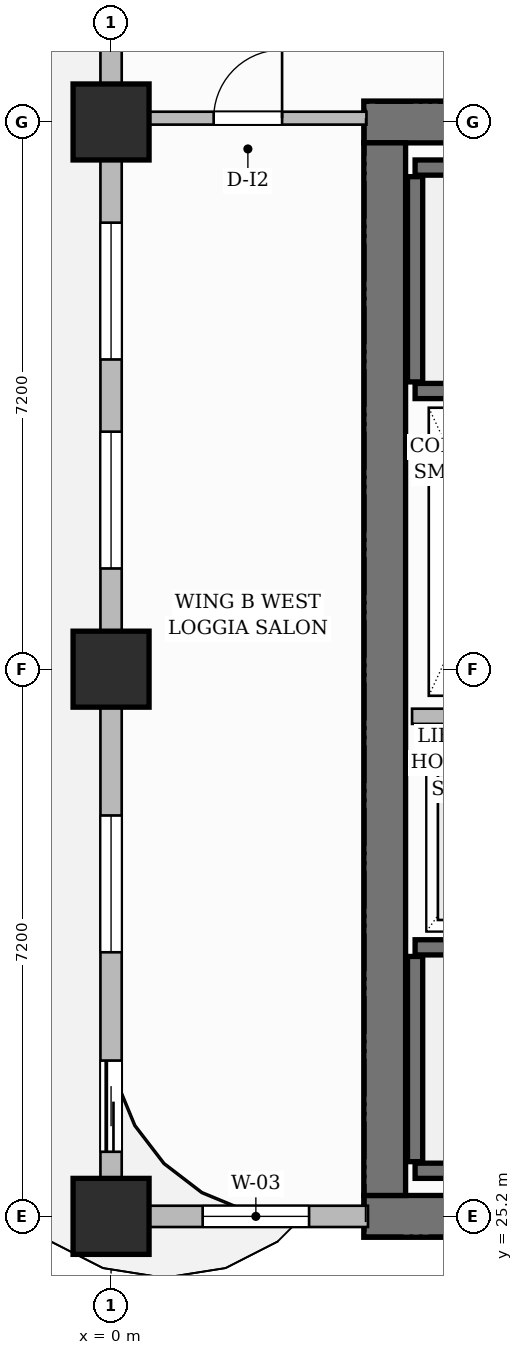
"""IFC4 building model, lengths in metres.
Left out: names, types, materials, properties, quantities, classifications, styles, units other than length and angle.
Written with IfcOpenShell. Run it as: python <this file> out.ifc"""

import sys

from ifc_helpers import new_model, si_unit, direction, frame, frame_2d, origin, origin_2d, place, context, subcontext, project, spatial, rectangle, extrude, source, transform, mapped, element, fill, save


model = new_model("IFC4")
c1 = context("Model", 3, precision=1e-05, world=origin(), true_north=direction((0.0, 1.0)))
c2 = subcontext(c1, "Body", "Model", "MODEL_VIEW")
j1 = project(units=[si_unit("LENGTHUNIT", "METRE"), si_unit("PLANEANGLEUNIT", "RADIAN")], contexts=[c1])
p1 = place(None, origin())
s1 = spatial("IfcSite", under=j1, at=p1, CompositionType="ELEMENT")
p2 = place(p1, origin())
s2 = spatial("IfcBuilding", under=s1, at=p2, CompositionType="ELEMENT")
p3 = place(p2, frame((0.0, 0.0, 134.0)))
s3 = spatial("IfcBuildingStorey", under=s2, at=p3, CompositionType="ELEMENT", Elevation=134.0)
for number, where, z_axis, x_axis in (
    (1, (3.325, 25.2, 0.0), (0.0, 0.0, 1.0), (1.0, 0.0, 0.0)),
    (2, (3.325, 39.6, 0.0), (0.0, 0.0, 1.0), (1.0, 0.0, 0.0)),
):
    element("IfcWall", number, at=place(p3, frame(where, z_axis=z_axis, x_axis=x_axis)), inside=s3, PredefinedType="SHEAR", context=c2, shape_type="SweptSolid", body=[
        extrude(rectangle(XDim=8.35, YDim=0.55, at=frame_2d((4.175, 0.0))), origin(), (0.0, 0.0, 1.0), 3.7),
    ])
p4 = place(p3, frame((3.6, 25.475, 0.0), z_axis=(0.0, 0.0, 1.0), x_axis=(0.0, 1.0, 0.0)))
e3 = element("IfcWall", 3, at=p4, inside=s3, PredefinedType="SHEAR", context=c2, shape_type="SweptSolid", body=[
    extrude(rectangle(XDim=13.85, YDim=0.55, at=frame_2d((6.925, 0.0))), origin(), (0.0, 0.0, 1.0), 3.7),
])
m1 = source(origin(), c2, "Body", "SweptSolid", [
    extrude(rectangle(XDim=1.0, YDim=1.0, at=origin_2d()), origin(), (0.0, 0.0, 1.0), 3.7),
])
for number, where, z_axis, x_axis in (
    (4, (0.0, 25.2, 0.0), (0.0, 0.0, 1.0), (1.0, 0.0, 0.0)),
    (5, (0.0, 32.4, 0.0), (0.0, 0.0, 1.0), (1.0, 0.0, 0.0)),
    (6, (0.0, 39.6, 0.0), (0.0, 0.0, 1.0), (1.0, 0.0, 0.0)),
):
    element("IfcColumn", number, at=place(p3, frame(where, z_axis=z_axis, x_axis=x_axis)), inside=s3, PredefinedType="COLUMN", context=c2, shape_type="MappedRepresentation", body=[
        mapped(m1, transform((0.0, 0.0, 0.0), scale=1.0)),
    ])
p5 = place(p3, frame((4.0, 25.8, 0.0), z_axis=(0.0, 0.0, 1.0), x_axis=(1.0, 0.0, 0.0)))
e7 = element("IfcWall", 7, at=p5, inside=s3, PredefinedType="SHEAR", context=c2, shape_type="SweptSolid", body=[
    extrude(rectangle(XDim=7.1, YDim=0.2, at=frame_2d((3.55, 0.0))), origin(), (0.0, 0.0, 1.0), 3.7),
])
p6 = place(p3, frame((4.0, 25.92, 0.0), z_axis=(0.0, 0.0, 1.0), x_axis=(0.0, 1.0, 0.0)))
e8 = element("IfcWall", 8, at=p6, inside=s3, PredefinedType="SHEAR", context=c2, shape_type="SweptSolid", body=[
    extrude(rectangle(XDim=2.7, YDim=0.2, at=frame_2d((1.35, 0.0))), origin(), (0.0, 0.0, 1.0), 3.7),
])
p7 = place(p3, frame((4.0, 28.74, 0.0), z_axis=(0.0, 0.0, 1.0), x_axis=(1.0, 0.0, 0.0)))
e9 = element("IfcWall", 9, at=p7, inside=s3, PredefinedType="SHEAR", context=c2, shape_type="SweptSolid", body=[
    extrude(rectangle(XDim=7.1, YDim=0.2, at=frame_2d((3.55, 0.0))), origin(), (0.0, 0.0, 1.0), 3.7),
])
p8 = place(p7, frame((5.815, 0.0, 0.0)))
e10 = element("IfcOpeningElement", 10, at=p8, cuts=e9, PredefinedType="OPENING", context=c2, shape_type="SweptSolid", body=[
    extrude(rectangle(XDim=1.05, YDim=2.2, at=frame_2d((0.525, 1.1))), frame((0.0, 0.11, 0.0), z_axis=(0.0, -1.0, 0.0), x_axis=(1.0, 0.0, 0.0)), (0.0, 0.0, 1.0), 0.22),
])
p9 = place(p3, frame((4.0, 39.0, 0.0), z_axis=(0.0, 0.0, 1.0), x_axis=(1.0, 0.0, 0.0)))
e11 = element("IfcWall", 11, at=p9, inside=s3, PredefinedType="SHEAR", context=c2, shape_type="SweptSolid", body=[
    extrude(rectangle(XDim=7.1, YDim=0.2, at=frame_2d((3.55, 0.0))), origin(), (0.0, 0.0, 1.0), 3.7),
])
p10 = place(p3, frame((4.0, 36.18, 0.0), z_axis=(0.0, 0.0, 1.0), x_axis=(0.0, 1.0, 0.0)))
e12 = element("IfcWall", 12, at=p10, inside=s3, PredefinedType="SHEAR", context=c2, shape_type="SweptSolid", body=[
    extrude(rectangle(XDim=2.7, YDim=0.2, at=frame_2d((1.35, 0.0))), origin(), (0.0, 0.0, 1.0), 3.7),
])
p11 = place(p3, frame((4.0, 36.06, 0.0), z_axis=(0.0, 0.0, 1.0), x_axis=(1.0, 0.0, 0.0)))
e13 = element("IfcWall", 13, at=p11, inside=s3, PredefinedType="SHEAR", context=c2, shape_type="SweptSolid", body=[
    extrude(rectangle(XDim=7.1, YDim=0.2, at=frame_2d((3.55, 0.0))), origin(), (0.0, 0.0, 1.0), 3.7),
])
p12 = place(p11, frame((5.815, 0.0, 0.0)))
e14 = element("IfcOpeningElement", 14, at=p12, cuts=e13, PredefinedType="OPENING", context=c2, shape_type="SweptSolid", body=[
    extrude(rectangle(XDim=1.05, YDim=2.2, at=frame_2d((0.525, 1.1))), frame((0.0, 0.11, 0.0), z_axis=(0.0, -1.0, 0.0), x_axis=(1.0, 0.0, 0.0)), (0.0, 0.0, 1.0), 0.22),
])
p13 = place(p3, frame((3.96, 31.78, 0.0), z_axis=(0.0, 0.0, 1.0), x_axis=(1.0, 0.0, 0.0)))
e15 = element("IfcWall", 15, at=p13, inside=s3, PredefinedType="PARTITIONING", context=c2, shape_type="SweptSolid", body=[
    extrude(rectangle(XDim=2.13, YDim=0.2, at=frame_2d((1.065, 0.0))), origin(), (0.0, 0.0, 1.0), 3.45),
])
p14 = place(p3, frame((0.24, 39.65, 0.0), z_axis=(0.0, 0.0, 1.0), x_axis=(1.0, 0.0, 0.0)))
e16 = element("IfcWall", 16, at=p14, inside=s3, PredefinedType="PARTITIONING", context=c2, shape_type="SweptSolid", body=[
    extrude(rectangle(XDim=3.12, YDim=0.17, at=frame_2d((1.56, 0.0))), origin(), (0.0, 0.0, 1.0), 3.45),
])
p15 = place(p14, frame((1.11, 0.0, 0.0)))
e17 = element("IfcOpeningElement", 17, at=p15, cuts=e16, PredefinedType="OPENING", context=c2, shape_type="SweptSolid", body=[
    extrude(rectangle(XDim=0.9, YDim=2.15, at=frame_2d((0.45, 1.075))), frame((0.0, 0.095, 0.0), z_axis=(0.0, -1.0, 0.0), x_axis=(1.0, 0.0, 0.0)), (0.0, 0.0, 1.0), 0.19),
])
p16 = place(p3, frame((0.0, 25.2, 0.0), z_axis=(0.0, 0.0, 1.0), x_axis=(1.0, 0.0, 0.0)))
e18 = element("IfcWall", 18, at=p16, inside=s3, PredefinedType="SOLIDWALL", context=c2, shape_type="SweptSolid", body=[
    extrude(rectangle(XDim=3.38, YDim=0.28, at=frame_2d((1.69, 0.0))), origin(), (0.0, 0.0, 1.0), 3.45),
])
p17 = place(p16, frame((1.205, 0.0, 0.8)))
e19 = element("IfcOpeningElement", 19, at=p17, cuts=e18, PredefinedType="OPENING", context=c2, shape_type="SweptSolid", body=[
    extrude(rectangle(XDim=1.4, YDim=1.85, at=frame_2d((0.7, 0.925))), frame((0.0, 0.15, 0.0), z_axis=(0.0, -1.0, 0.0), x_axis=(1.0, 0.0, 0.0)), (0.0, 0.0, 1.0), 0.3),
])
p18 = place(p3, frame((0.0, 25.25, 0.0), z_axis=(0.0, 0.0, 1.0), x_axis=(0.0, 1.0, 0.0)))
e20 = element("IfcWall", 20, at=p18, inside=s3, PredefinedType="SOLIDWALL", context=c2, shape_type="SweptSolid", body=[
    extrude(rectangle(XDim=21.5, YDim=0.28, at=frame_2d((10.75, 0.0))), origin(), (0.0, 0.0, 1.0), 2.935),
])
p19 = place(p18, frame((18.45, 0.0, 0.0)))
e21 = element("IfcOpeningElement", 21, at=p19, cuts=e20, PredefinedType="OPENING", context=c2, shape_type="SweptSolid", body=[
    extrude(rectangle(XDim=1.2, YDim=2.2, at=frame_2d((0.6, 1.1))), frame((0.0, 0.15, 0.0), z_axis=(0.0, -1.0, 0.0), x_axis=(1.0, 0.0, 0.0)), (0.0, 0.0, 1.0), 0.3),
])
p20 = place(p18, frame((0.8, 0.0, 0.0)))
e22 = element("IfcOpeningElement", 22, at=p20, cuts=e20, PredefinedType="OPENING", context=c2, shape_type="SweptSolid", body=[
    extrude(rectangle(XDim=1.2, YDim=2.2, at=frame_2d((0.6, 1.1))), frame((0.0, 0.15, 0.0), z_axis=(0.0, -1.0, 0.0), x_axis=(1.0, 0.0, 0.0)), (0.0, 0.0, 1.0), 0.3),
])
p21 = place(p18, frame((3.425, 0.0, 0.8)))
e23 = element("IfcOpeningElement", 23, at=p21, cuts=e20, PredefinedType="OPENING", context=c2, shape_type="SweptSolid", body=[
    extrude(rectangle(XDim=1.8, YDim=1.85, at=frame_2d((0.9, 0.925))), frame((0.0, 0.15, 0.0), z_axis=(0.0, -1.0, 0.0), x_axis=(1.0, 0.0, 0.0)), (0.0, 0.0, 1.0), 0.3),
])
p22 = place(p18, frame((8.475, 0.0, 0.8)))
e24 = element("IfcOpeningElement", 24, at=p22, cuts=e20, PredefinedType="OPENING", context=c2, shape_type="SweptSolid", body=[
    extrude(rectangle(XDim=1.8, YDim=1.85, at=frame_2d((0.9, 0.925))), frame((0.0, 0.15, 0.0), z_axis=(0.0, -1.0, 0.0), x_axis=(1.0, 0.0, 0.0)), (0.0, 0.0, 1.0), 0.3),
])
p23 = place(p18, frame((11.225, 0.0, 0.8)))
e25 = element("IfcOpeningElement", 25, at=p23, cuts=e20, PredefinedType="OPENING", context=c2, shape_type="SweptSolid", body=[
    extrude(rectangle(XDim=1.8, YDim=1.85, at=frame_2d((0.9, 0.925))), frame((0.0, 0.15, 0.0), z_axis=(0.0, -1.0, 0.0), x_axis=(1.0, 0.0, 0.0)), (0.0, 0.0, 1.0), 0.3),
])
p24 = place(p18, frame((15.75, 0.0, 0.8)))
e26 = element("IfcOpeningElement", 26, at=p24, cuts=e20, PredefinedType="OPENING", context=c2, shape_type="SweptSolid", body=[
    extrude(rectangle(XDim=1.8, YDim=1.85, at=frame_2d((0.9, 0.925))), frame((0.0, 0.15, 0.0), z_axis=(0.0, -1.0, 0.0), x_axis=(1.0, 0.0, 0.0)), (0.0, 0.0, 1.0), 0.3),
])
m2 = source(origin(), c2, "Body", "SweptSolid", [
    extrude(rectangle(XDim=0.9, YDim=2.15, at=frame_2d((0.45, 1.075))), frame((0.0, 0.025, 0.0), z_axis=(0.0, -1.0, 0.0), x_axis=(1.0, 0.0, 0.0)), (0.0, 0.0, 1.0), 0.05),
])
p25 = place(p15, origin())
e27 = element("IfcDoor", 27, at=p25, inside=s3, OperationType="SINGLE_SWING_RIGHT", PredefinedType="DOOR", context=c2, shape_type="MappedRepresentation", body=[
    mapped(m2, transform((0.0, 0.0, 0.0), scale=1.0)),
])
fill(e17, e27)
m3 = source(origin(), c2, "Body", "SweptSolid", [
    extrude(rectangle(XDim=1.2, YDim=2.2, at=frame_2d((0.6, 1.1))), frame((0.0, 0.025, 0.0), z_axis=(0.0, -1.0, 0.0), x_axis=(1.0, 0.0, 0.0)), (0.0, 0.0, 1.0), 0.05),
])
p26 = place(p20, origin())
e28 = element("IfcDoor", 28, at=p26, inside=s3, OperationType="SLIDING_TO_LEFT", PredefinedType="DOOR", context=c2, shape_type="MappedRepresentation", body=[
    mapped(m3, transform((0.0, 0.0, 0.0), scale=1.0)),
])
fill(e22, e28)
m4 = source(origin(), c2, "Body", "SweptSolid", [
    extrude(rectangle(XDim=1.4, YDim=1.85, at=frame_2d((0.7, 0.925))), frame((0.0, 0.03, 0.0), z_axis=(0.0, -1.0, 0.0), x_axis=(1.0, 0.0, 0.0)), (0.0, 0.0, 1.0), 0.06),
])
p27 = place(p17, origin())
e29 = element("IfcWindow", 29, at=p27, inside=s3, PartitioningType="SINGLE_PANEL", PredefinedType="WINDOW", context=c2, shape_type="MappedRepresentation", body=[
    mapped(m4, transform((0.0, 0.0, 0.0), scale=1.0)),
])
fill(e19, e29)
m5 = source(origin(), c2, "Body", "SweptSolid", [
    extrude(rectangle(XDim=1.8, YDim=1.85, at=frame_2d((0.9, 0.925))), frame((0.0, 0.03, 0.0), z_axis=(0.0, -1.0, 0.0), x_axis=(1.0, 0.0, 0.0)), (0.0, 0.0, 1.0), 0.06),
])
p28 = place(p21, origin())
e30 = element("IfcWindow", 30, at=p28, inside=s3, PartitioningType="DOUBLE_PANEL_VERTICAL", PredefinedType="WINDOW", context=c2, shape_type="MappedRepresentation", body=[
    mapped(m5, transform((0.0, 0.0, 0.0), scale=1.0)),
])
fill(e23, e30)
p29 = place(p22, origin())
e31 = element("IfcWindow", 31, at=p29, inside=s3, PartitioningType="DOUBLE_PANEL_VERTICAL", PredefinedType="WINDOW", context=c2, shape_type="MappedRepresentation", body=[
    mapped(m5, transform((0.0, 0.0, 0.0), scale=1.0)),
])
fill(e24, e31)
p30 = place(p23, origin())
e32 = element("IfcWindow", 32, at=p30, inside=s3, PartitioningType="DOUBLE_PANEL_VERTICAL", PredefinedType="WINDOW", context=c2, shape_type="MappedRepresentation", body=[
    mapped(m5, transform((0.0, 0.0, 0.0), scale=1.0)),
])
fill(e25, e32)
save(model, sys.argv[1])
